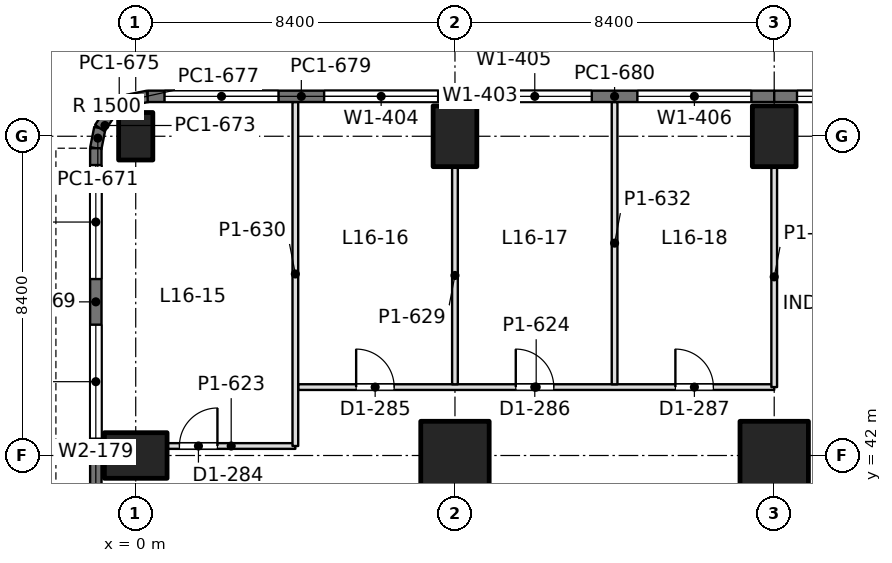
"""IFC4 building model, lengths in metres.
Left out: names, types, materials, properties, quantities, classifications, styles, units other than length and angle.
Written with IfcOpenShell. Run it as: python <this file> out.ifc"""

import sys

from ifc_helpers import new_model, si_unit, direction, frame, frame_2d, origin, origin_2d, place, context, subcontext, project, spatial, rectangle, extrude, element, fill, save


model = new_model("IFC4")
c1 = context("Model", 3, precision=1e-05, world=origin(), true_north=direction((0.0, 1.0)))
c2 = subcontext(c1, "Body", "Model", "MODEL_VIEW")
j1 = project(units=[si_unit("LENGTHUNIT", "METRE"), si_unit("PLANEANGLEUNIT", "RADIAN")], contexts=[c1])
p1 = place(None, origin())
s1 = spatial("IfcSite", under=j1, at=p1, CompositionType="ELEMENT")
p2 = place(p1, origin())
s2 = spatial("IfcBuilding", under=s1, at=p2, CompositionType="ELEMENT")
p3 = place(p2, frame((0.0, 0.0, 72.9)))
s3 = spatial("IfcBuildingStorey", under=s2, at=p3, CompositionType="ELEMENT", Elevation=72.9)
p4 = place(p3, frame((0.0, 42.0, 0.0), z_axis=(0.0, 0.0, 1.0), x_axis=(0.0, 1.0, 0.0)))
e1 = element("IfcColumn", 1, at=p4, inside=s3, PredefinedType="COLUMN", context=c2, shape_type="SweptSolid", body=[
    extrude(rectangle(XDim=1.2, YDim=1.65, at=origin_2d()), origin(), (0.0, 0.0, 1.0), 4.5),
])
p5 = place(p3, frame((0.0, 50.4, 0.0), z_axis=(0.0, 0.0, 1.0), x_axis=(1.0, 0.0, 0.0)))
e2 = element("IfcColumn", 2, at=p5, inside=s3, PredefinedType="COLUMN", context=c2, shape_type="SweptSolid", body=[
    extrude(rectangle(XDim=0.9, YDim=1.25, at=origin_2d()), origin(), (0.0, 0.0, 1.0), 4.5),
])
p6 = place(p3, frame((8.4, 42.0, 0.0), z_axis=(0.0, 0.0, 1.0), x_axis=(1.0, 0.0, 0.0)))
e3 = element("IfcColumn", 3, at=p6, inside=s3, PredefinedType="COLUMN", context=c2, shape_type="SweptSolid", body=[
    extrude(rectangle(XDim=1.8, YDim=1.8, at=origin_2d()), origin(), (0.0, 0.0, 1.0), 4.5),
])
p7 = place(p3, frame((8.4, 50.4, 0.0), z_axis=(0.0, 0.0, 1.0), x_axis=(1.0, 0.0, 0.0)))
e4 = element("IfcColumn", 4, at=p7, inside=s3, PredefinedType="COLUMN", context=c2, shape_type="SweptSolid", body=[
    extrude(rectangle(XDim=1.15, YDim=1.6, at=origin_2d()), origin(), (0.0, 0.0, 1.0), 4.5),
])
p8 = place(p3, frame((16.8, 42.0, 0.0), z_axis=(0.0, 0.0, 1.0), x_axis=(1.0, 0.0, 0.0)))
e5 = element("IfcColumn", 5, at=p8, inside=s3, PredefinedType="COLUMN", context=c2, shape_type="SweptSolid", body=[
    extrude(rectangle(XDim=1.8, YDim=1.8, at=origin_2d()), origin(), (0.0, 0.0, 1.0), 4.5),
])
p9 = place(p3, frame((16.8, 50.4, 0.0), z_axis=(0.0, 0.0, 1.0), x_axis=(1.0, 0.0, 0.0)))
e6 = element("IfcColumn", 6, at=p9, inside=s3, PredefinedType="COLUMN", context=c2, shape_type="SweptSolid", body=[
    extrude(rectangle(XDim=1.15, YDim=1.6, at=origin_2d()), origin(), (0.0, 0.0, 1.0), 4.5),
])
p10 = place(p3, frame((-1.05, 37.8, 0.0), z_axis=(0.0, 0.0, 1.0), x_axis=(0.0, 1.0, 0.0)))
e7 = element("IfcWall", 7, at=p10, inside=s3, PredefinedType="SOLIDWALL", context=c2, shape_type="SweptSolid", body=[
    extrude(rectangle(XDim=4.2, YDim=0.3, at=frame_2d((2.1, 0.0))), origin(), (0.0, 0.0, 1.0), 4.34),
])
p11 = place(p10, frame((0.9, 0.0, 0.9)))
e8 = element("IfcOpeningElement", 8, at=p11, cuts=e7, PredefinedType="OPENING", context=c2, shape_type="SweptSolid", body=[
    extrude(rectangle(XDim=2.4, YDim=1.9, at=frame_2d((1.2, 0.95))), frame((0.0, 0.16, 0.0), z_axis=(0.0, -1.0, 0.0), x_axis=(1.0, 0.0, 0.0)), (0.0, 0.0, 1.0), 0.32),
])
p12 = place(p3, frame((-1.05, 42.0, 0.0), z_axis=(0.0, 0.0, 1.0), x_axis=(0.0, 1.0, 0.0)))
e9 = element("IfcWall", 9, at=p12, inside=s3, PredefinedType="SOLIDWALL", context=c2, shape_type="SweptSolid", body=[
    extrude(rectangle(XDim=8.085, YDim=0.3, at=frame_2d((4.042, 0.0))), origin(), (0.0, 0.0, 1.0), 4.34),
])
p13 = place(p12, frame((0.443, 0.0, 0.9)))
e10 = element("IfcOpeningElement", 10, at=p13, cuts=e9, PredefinedType="OPENING", context=c2, shape_type="SweptSolid", body=[
    extrude(rectangle(XDim=3.0, YDim=1.9, at=frame_2d((1.5, 0.95))), frame((0.0, 0.16, 0.0), z_axis=(0.0, -1.0, 0.0), x_axis=(1.0, 0.0, 0.0)), (0.0, 0.0, 1.0), 0.32),
])
p14 = place(p12, frame((4.643, 0.0, 0.9)))
e11 = element("IfcOpeningElement", 11, at=p14, cuts=e9, PredefinedType="OPENING", context=c2, shape_type="SweptSolid", body=[
    extrude(rectangle(XDim=3.0, YDim=1.9, at=frame_2d((1.5, 0.95))), frame((0.0, 0.16, 0.0), z_axis=(0.0, -1.0, 0.0), x_axis=(1.0, 0.0, 0.0)), (0.0, 0.0, 1.0), 0.32),
])
p15 = place(p3, frame((-1.05, 50.085, 0.0), z_axis=(0.0, 0.0, 1.0), x_axis=(0.195073962632, 0.980788534345, 0.0)))
e12 = element("IfcWall", 12, at=p15, inside=s3, PredefinedType="SOLIDWALL", context=c2, shape_type="SweptSolid", body=[
    extrude(rectangle(XDim=0.541, YDim=0.3, at=frame_2d((0.271, 0.0))), origin(), (0.0, 0.0, 1.0), 4.34),
])
for number, where, z_axis, x_axis in (
    (13, (-0.945, 50.615, 0.0), (0.0, 0.0, 1.0), (0.556, 0.831, 0.0)),
    (14, (-0.653, 51.052, 0.0), (0.0, 0.0, 1.0), (0.831, 0.556, 0.0)),
):
    element("IfcWall", number, at=place(p3, frame(where, z_axis=z_axis, x_axis=x_axis)), inside=s3, PredefinedType="SOLIDWALL", context=c2, shape_type="SweptSolid", body=[
        extrude(rectangle(XDim=0.526, YDim=0.3, at=frame_2d((0.263, 0.0))), origin(), (0.0, 0.0, 1.0), 4.34),
    ])
p16 = place(p3, frame((-0.216, 51.344, 0.0), z_axis=(0.0, 0.0, 1.0), x_axis=(0.980788534345, 0.195073962632, 0.0)))
e15 = element("IfcWall", 15, at=p16, inside=s3, PredefinedType="SOLIDWALL", context=c2, shape_type="SweptSolid", body=[
    extrude(rectangle(XDim=0.541, YDim=0.3, at=frame_2d((0.271, 0.0))), origin(), (0.0, 0.0, 1.0), 4.34),
])
p17 = place(p3, frame((0.315, 51.45, 0.0), z_axis=(0.0, 0.0, 1.0), x_axis=(1.0, 0.0, 0.0)))
e16 = element("IfcWall", 16, at=p17, inside=s3, PredefinedType="SOLIDWALL", context=c2, shape_type="SweptSolid", body=[
    extrude(rectangle(XDim=8.085, YDim=0.3, at=frame_2d((4.042, 0.0))), origin(), (0.0, 0.0, 1.0), 4.34),
])
p18 = place(p17, frame((0.443, 0.0, 0.9)))
e17 = element("IfcOpeningElement", 17, at=p18, cuts=e16, PredefinedType="OPENING", context=c2, shape_type="SweptSolid", body=[
    extrude(rectangle(XDim=3.0, YDim=1.9, at=frame_2d((1.5, 0.95))), frame((0.0, 0.16, 0.0), z_axis=(0.0, -1.0, 0.0), x_axis=(1.0, 0.0, 0.0)), (0.0, 0.0, 1.0), 0.32),
])
p19 = place(p17, frame((4.643, 0.0, 0.9)))
e18 = element("IfcOpeningElement", 18, at=p19, cuts=e16, PredefinedType="OPENING", context=c2, shape_type="SweptSolid", body=[
    extrude(rectangle(XDim=3.0, YDim=1.9, at=frame_2d((1.5, 0.95))), frame((0.0, 0.16, 0.0), z_axis=(0.0, -1.0, 0.0), x_axis=(1.0, 0.0, 0.0)), (0.0, 0.0, 1.0), 0.32),
])
p20 = place(p3, frame((8.4, 51.45, 0.0), z_axis=(0.0, 0.0, 1.0), x_axis=(1.0, 0.0, 0.0)))
e19 = element("IfcWall", 19, at=p20, inside=s3, PredefinedType="SOLIDWALL", context=c2, shape_type="SweptSolid", body=[
    extrude(rectangle(XDim=8.4, YDim=0.3, at=frame_2d((4.2, 0.0))), origin(), (0.0, 0.0, 1.0), 4.34),
])
p21 = place(p20, frame((0.6, 0.0, 0.9)))
e20 = element("IfcOpeningElement", 20, at=p21, cuts=e19, PredefinedType="OPENING", context=c2, shape_type="SweptSolid", body=[
    extrude(rectangle(XDim=3.0, YDim=1.9, at=frame_2d((1.5, 0.95))), frame((0.0, 0.16, 0.0), z_axis=(0.0, -1.0, 0.0), x_axis=(1.0, 0.0, 0.0)), (0.0, 0.0, 1.0), 0.32),
])
p22 = place(p20, frame((4.8, 0.0, 0.9)))
e21 = element("IfcOpeningElement", 21, at=p22, cuts=e19, PredefinedType="OPENING", context=c2, shape_type="SweptSolid", body=[
    extrude(rectangle(XDim=3.0, YDim=1.9, at=frame_2d((1.5, 0.95))), frame((0.0, 0.16, 0.0), z_axis=(0.0, -1.0, 0.0), x_axis=(1.0, 0.0, 0.0)), (0.0, 0.0, 1.0), 0.32),
])
p23 = place(p3, frame((16.8, 51.45, 0.0), z_axis=(0.0, 0.0, 1.0), x_axis=(1.0, 0.0, 0.0)))
e22 = element("IfcWall", 22, at=p23, inside=s3, PredefinedType="SOLIDWALL", context=c2, shape_type="SweptSolid", body=[
    extrude(rectangle(XDim=8.4, YDim=0.3, at=frame_2d((4.2, 0.0))), origin(), (0.0, 0.0, 1.0), 4.34),
])
p24 = place(p23, frame((0.6, 0.0, 0.9)))
e23 = element("IfcOpeningElement", 23, at=p24, cuts=e22, PredefinedType="OPENING", context=c2, shape_type="SweptSolid", body=[
    extrude(rectangle(XDim=3.0, YDim=1.9, at=frame_2d((1.5, 0.95))), frame((0.0, 0.16, 0.0), z_axis=(0.0, -1.0, 0.0), x_axis=(1.0, 0.0, 0.0)), (0.0, 0.0, 1.0), 0.32),
])
p25 = place(p23, frame((4.8, 0.0, 0.9)))
e24 = element("IfcOpeningElement", 24, at=p25, cuts=e22, PredefinedType="OPENING", context=c2, shape_type="SweptSolid", body=[
    extrude(rectangle(XDim=3.0, YDim=1.9, at=frame_2d((1.5, 0.95))), frame((0.0, 0.16, 0.0), z_axis=(0.0, -1.0, 0.0), x_axis=(1.0, 0.0, 0.0)), (0.0, 0.0, 1.0), 0.32),
])
p26 = place(p3, frame((0.824, 42.25, 0.0), z_axis=(0.0, 0.0, 1.0), x_axis=(1.0, 0.0, 0.0)))
e25 = element("IfcWall", 25, at=p26, inside=s3, PredefinedType="PARTITIONING", context=c2, shape_type="SweptSolid", body=[
    extrude(rectangle(XDim=3.376, YDim=0.15, at=frame_2d((1.688, 0.0))), origin(), (0.0, 0.0, 1.0), 3.84),
])
p27 = place(p26, frame((0.326, 0.0, 0.0)))
e26 = element("IfcOpeningElement", 26, at=p27, cuts=e25, PredefinedType="OPENING", context=c2, shape_type="SweptSolid", body=[
    extrude(rectangle(XDim=1.0, YDim=2.2, at=frame_2d((0.5, 1.1))), frame((0.0, 0.085, 0.0), z_axis=(0.0, -1.0, 0.0), x_axis=(1.0, 0.0, 0.0)), (0.0, 0.0, 1.0), 0.17),
])
p28 = place(p3, frame((4.274, 43.8, 0.0), z_axis=(0.0, 0.0, 1.0), x_axis=(1.0, 0.0, 0.0)))
e27 = element("IfcWall", 27, at=p28, inside=s3, PredefinedType="PARTITIONING", context=c2, shape_type="SweptSolid", body=[
    extrude(rectangle(XDim=12.526, YDim=0.15, at=frame_2d((6.263, 0.0))), origin(), (0.0, 0.0, 1.0), 3.74),
])
p29 = place(p28, frame((1.526, 0.0, 0.0)))
e28 = element("IfcOpeningElement", 28, at=p29, cuts=e27, PredefinedType="OPENING", context=c2, shape_type="SweptSolid", body=[
    extrude(rectangle(XDim=1.0, YDim=2.2, at=frame_2d((0.5, 1.1))), frame((0.0, 0.085, 0.0), z_axis=(0.0, -1.0, 0.0), x_axis=(1.0, 0.0, 0.0)), (0.0, 0.0, 1.0), 0.17),
])
p30 = place(p28, frame((5.726, 0.0, 0.0)))
e29 = element("IfcOpeningElement", 29, at=p30, cuts=e27, PredefinedType="OPENING", context=c2, shape_type="SweptSolid", body=[
    extrude(rectangle(XDim=1.0, YDim=2.2, at=frame_2d((0.5, 1.1))), frame((0.0, 0.085, 0.0), z_axis=(0.0, -1.0, 0.0), x_axis=(1.0, 0.0, 0.0)), (0.0, 0.0, 1.0), 0.17),
])
p31 = place(p28, frame((9.926, 0.0, 0.0)))
e30 = element("IfcOpeningElement", 30, at=p31, cuts=e27, PredefinedType="OPENING", context=c2, shape_type="SweptSolid", body=[
    extrude(rectangle(XDim=1.0, YDim=2.2, at=frame_2d((0.5, 1.1))), frame((0.0, 0.085, 0.0), z_axis=(0.0, -1.0, 0.0), x_axis=(1.0, 0.0, 0.0)), (0.0, 0.0, 1.0), 0.17),
])
p32 = place(p3, frame((4.2, 42.25, 0.0), z_axis=(0.0, 0.0, 1.0), x_axis=(0.0, 1.0, 0.0)))
e31 = element("IfcWall", 31, at=p32, inside=s3, PredefinedType="PARTITIONING", context=c2, shape_type="SweptSolid", body=[
    extrude(rectangle(XDim=9.052, YDim=0.15, at=frame_2d((4.526, 0.0))), origin(), (0.0, 0.0, 1.0), 3.84),
])
p33 = place(p3, frame((8.4, 43.874, 0.0), z_axis=(0.0, 0.0, 1.0), x_axis=(0.0, 1.0, 0.0)))
e32 = element("IfcWall", 32, at=p33, inside=s3, PredefinedType="PARTITIONING", context=c2, shape_type="SweptSolid", body=[
    extrude(rectangle(XDim=5.727, YDim=0.15, at=frame_2d((2.864, 0.0))), origin(), (0.0, 0.0, 1.0), 3.74),
])
p34 = place(p3, frame((12.6, 43.874, 0.0), z_axis=(0.0, 0.0, 1.0), x_axis=(0.0, 1.0, 0.0)))
e33 = element("IfcWall", 33, at=p34, inside=s3, PredefinedType="PARTITIONING", context=c2, shape_type="SweptSolid", body=[
    extrude(rectangle(XDim=7.428, YDim=0.15, at=frame_2d((3.714, 0.0))), origin(), (0.0, 0.0, 1.0), 3.84),
])
p35 = place(p3, frame((16.8, 43.8, 0.0), z_axis=(0.0, 0.0, 1.0), x_axis=(0.0, 1.0, 0.0)))
e34 = element("IfcWall", 34, at=p35, inside=s3, PredefinedType="PARTITIONING", context=c2, shape_type="SweptSolid", body=[
    extrude(rectangle(XDim=5.801, YDim=0.15, at=frame_2d((2.9, 0.0))), origin(), (0.0, 0.0, 1.0), 3.74),
])
p36 = place(p13, origin())
e35 = element("IfcWindow", 35, at=p36, inside=s3, PartitioningType="SINGLE_PANEL", PredefinedType="WINDOW", context=c2, shape_type="SweptSolid", body=[
    extrude(rectangle(XDim=3.0, YDim=1.9, at=frame_2d((1.5, 0.95))), frame((0.0, 0.03, 0.0), z_axis=(0.0, -1.0, 0.0), x_axis=(1.0, 0.0, 0.0)), (0.0, 0.0, 1.0), 0.06),
])
fill(e10, e35)
p37 = place(p14, origin())
e36 = element("IfcWindow", 36, at=p37, inside=s3, PartitioningType="SINGLE_PANEL", PredefinedType="WINDOW", context=c2, shape_type="SweptSolid", body=[
    extrude(rectangle(XDim=3.0, YDim=1.9, at=frame_2d((1.5, 0.95))), frame((0.0, 0.03, 0.0), z_axis=(0.0, -1.0, 0.0), x_axis=(1.0, 0.0, 0.0)), (0.0, 0.0, 1.0), 0.06),
])
fill(e11, e36)
p38 = place(p18, origin())
e37 = element("IfcWindow", 37, at=p38, inside=s3, PartitioningType="SINGLE_PANEL", PredefinedType="WINDOW", context=c2, shape_type="SweptSolid", body=[
    extrude(rectangle(XDim=3.0, YDim=1.9, at=frame_2d((1.5, 0.95))), frame((0.0, 0.03, 0.0), z_axis=(0.0, -1.0, 0.0), x_axis=(1.0, 0.0, 0.0)), (0.0, 0.0, 1.0), 0.06),
])
fill(e17, e37)
p39 = place(p19, origin())
e38 = element("IfcWindow", 38, at=p39, inside=s3, PartitioningType="SINGLE_PANEL", PredefinedType="WINDOW", context=c2, shape_type="SweptSolid", body=[
    extrude(rectangle(XDim=3.0, YDim=1.9, at=frame_2d((1.5, 0.95))), frame((0.0, 0.03, 0.0), z_axis=(0.0, -1.0, 0.0), x_axis=(1.0, 0.0, 0.0)), (0.0, 0.0, 1.0), 0.06),
])
fill(e18, e38)
p40 = place(p21, origin())
e39 = element("IfcWindow", 39, at=p40, inside=s3, PartitioningType="SINGLE_PANEL", PredefinedType="WINDOW", context=c2, shape_type="SweptSolid", body=[
    extrude(rectangle(XDim=3.0, YDim=1.9, at=frame_2d((1.5, 0.95))), frame((0.0, 0.03, 0.0), z_axis=(0.0, -1.0, 0.0), x_axis=(1.0, 0.0, 0.0)), (0.0, 0.0, 1.0), 0.06),
])
fill(e20, e39)
p41 = place(p22, origin())
e40 = element("IfcWindow", 40, at=p41, inside=s3, PartitioningType="SINGLE_PANEL", PredefinedType="WINDOW", context=c2, shape_type="SweptSolid", body=[
    extrude(rectangle(XDim=3.0, YDim=1.9, at=frame_2d((1.5, 0.95))), frame((0.0, 0.03, 0.0), z_axis=(0.0, -1.0, 0.0), x_axis=(1.0, 0.0, 0.0)), (0.0, 0.0, 1.0), 0.06),
])
fill(e21, e40)
p42 = place(p24, origin())
e41 = element("IfcWindow", 41, at=p42, inside=s3, PartitioningType="SINGLE_PANEL", PredefinedType="WINDOW", context=c2, shape_type="SweptSolid", body=[
    extrude(rectangle(XDim=3.0, YDim=1.9, at=frame_2d((1.5, 0.95))), frame((0.0, 0.03, 0.0), z_axis=(0.0, -1.0, 0.0), x_axis=(1.0, 0.0, 0.0)), (0.0, 0.0, 1.0), 0.06),
])
fill(e23, e41)
p43 = place(p27, origin())
e42 = element("IfcDoor", 42, at=p43, inside=s3, OperationType="SINGLE_SWING_RIGHT", PredefinedType="DOOR", context=c2, shape_type="SweptSolid", body=[
    extrude(rectangle(XDim=1.0, YDim=2.2, at=frame_2d((0.5, 1.1))), frame((0.0, 0.025, 0.0), z_axis=(0.0, -1.0, 0.0), x_axis=(1.0, 0.0, 0.0)), (0.0, 0.0, 1.0), 0.05),
])
fill(e26, e42)
p44 = place(p29, origin())
e43 = element("IfcDoor", 43, at=p44, inside=s3, OperationType="SINGLE_SWING_LEFT", PredefinedType="DOOR", context=c2, shape_type="SweptSolid", body=[
    extrude(rectangle(XDim=1.0, YDim=2.2, at=frame_2d((0.5, 1.1))), frame((0.0, 0.025, 0.0), z_axis=(0.0, -1.0, 0.0), x_axis=(1.0, 0.0, 0.0)), (0.0, 0.0, 1.0), 0.05),
])
fill(e28, e43)
p45 = place(p30, origin())
e44 = element("IfcDoor", 44, at=p45, inside=s3, OperationType="SINGLE_SWING_LEFT", PredefinedType="DOOR", context=c2, shape_type="SweptSolid", body=[
    extrude(rectangle(XDim=1.0, YDim=2.2, at=frame_2d((0.5, 1.1))), frame((0.0, 0.025, 0.0), z_axis=(0.0, -1.0, 0.0), x_axis=(1.0, 0.0, 0.0)), (0.0, 0.0, 1.0), 0.05),
])
fill(e29, e44)
p46 = place(p31, origin())
e45 = element("IfcDoor", 45, at=p46, inside=s3, OperationType="SINGLE_SWING_LEFT", PredefinedType="DOOR", context=c2, shape_type="SweptSolid", body=[
    extrude(rectangle(XDim=1.0, YDim=2.2, at=frame_2d((0.5, 1.1))), frame((0.0, 0.025, 0.0), z_axis=(0.0, -1.0, 0.0), x_axis=(1.0, 0.0, 0.0)), (0.0, 0.0, 1.0), 0.05),
])
fill(e30, e45)
save(model, sys.argv[1])
